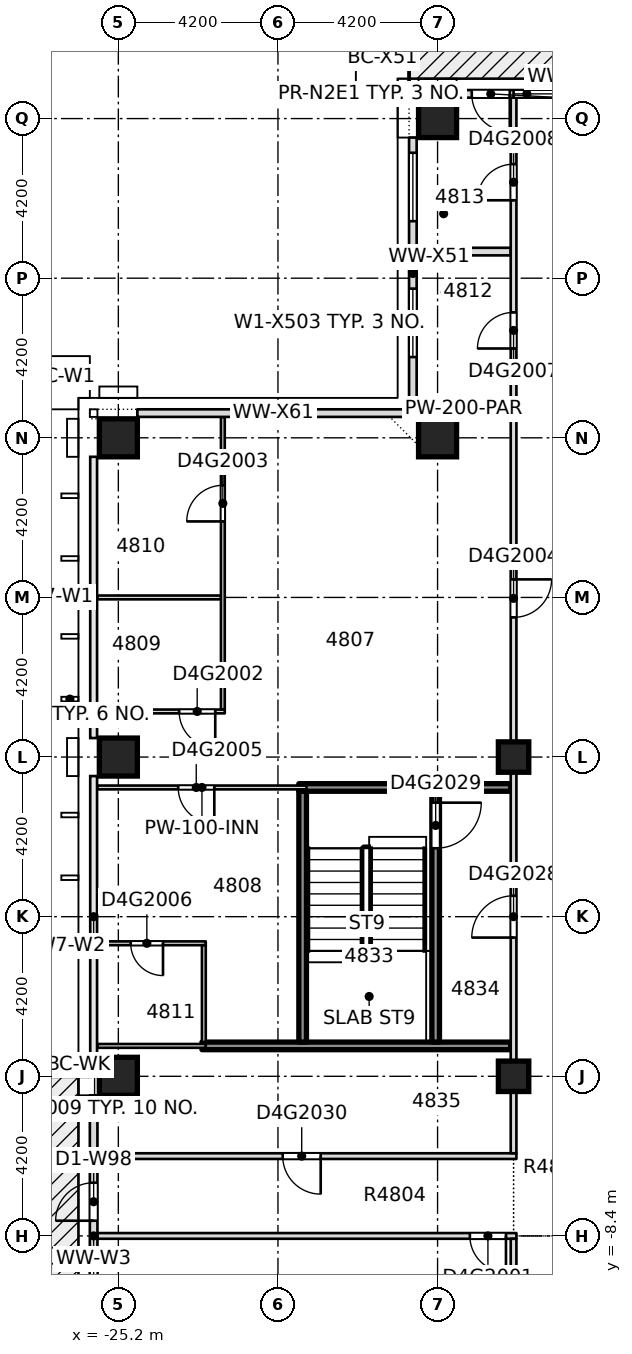
"""IFC4 building model, lengths in metres.
Left out: names, types, materials, properties, quantities, classifications, styles, units other than length and angle.
Written with IfcOpenShell. Run it as: python <this file> out.ifc"""

import sys

from ifc_helpers import new_model, si_unit, direction, frame, frame_2d, origin, origin_2d, place, context, subcontext, project, spatial, rectangle, extrude, element, fill, save


model = new_model("IFC4")
c1 = context("Model", 3, precision=1e-05, world=origin(), true_north=direction((0.0, 1.0)))
c2 = subcontext(c1, "Body", "Model", "MODEL_VIEW")
j1 = project(units=[si_unit("LENGTHUNIT", "METRE"), si_unit("PLANEANGLEUNIT", "RADIAN")], contexts=[c1])
p1 = place(None, origin())
s1 = spatial("IfcSite", under=j1, at=p1, CompositionType="ELEMENT")
p2 = place(p1, origin())
s2 = spatial("IfcBuilding", under=s1, at=p2, CompositionType="ELEMENT")
p3 = place(p2, frame((0.0, 0.0, 185.9)))
s3 = spatial("IfcBuildingStorey", under=s2, at=p3, CompositionType="ELEMENT", Elevation=185.9)
for number, where, z_axis, x_axis in (
    (1, (-25.2, -4.2, -0.4), (0.0, 0.0, 1.0), (1.0, 0.0, 0.0)),
    (2, (-25.2, 4.2, -0.4), (0.0, 0.0, 1.0), (1.0, 0.0, 0.0)),
    (3, (-25.2, 12.6, -0.4), (0.0, 0.0, 1.0), (1.0, 0.0, 0.0)),
    (4, (-16.8, 12.6, -0.4), (0.0, 0.0, 1.0), (1.0, 0.0, 0.0)),
    (5, (-16.8, 21.0, -0.4), (0.0, 0.0, 1.0), (1.0, 0.0, 0.0)),
):
    element("IfcColumn", number, at=place(p3, frame(where, z_axis=z_axis, x_axis=x_axis)), inside=s3, PredefinedType="COLUMN", context=c2, shape_type="SweptSolid", body=[
        extrude(rectangle(XDim=1.0, YDim=1.0, at=origin_2d()), origin(), (0.0, 0.0, 1.0), 3.45),
    ])
for number, where, z_axis, x_axis in (
    (6, (-14.8, -4.2, -0.4), (0.0, 0.0, 1.0), (1.0, 0.0, 0.0)),
    (7, (-14.8, 4.2, -0.4), (0.0, 0.0, 1.0), (1.0, 0.0, 0.0)),
):
    element("IfcColumn", number, at=place(p3, frame(where, z_axis=z_axis, x_axis=x_axis)), inside=s3, PredefinedType="COLUMN", context=c2, shape_type="SweptSolid", body=[
        extrude(rectangle(XDim=0.8, YDim=0.8, at=origin_2d()), origin(), (0.0, 0.0, 1.0), 3.45),
    ])
p4 = place(p3, frame((-25.75, -8.4, 0.0), z_axis=(0.0, 0.0, 1.0), x_axis=(1.0, 0.0, 0.0)))
e8 = element("IfcWall", 8, at=p4, inside=s3, PredefinedType="PARTITIONING", context=c2, shape_type="SweptSolid", body=[
    extrude(rectangle(XDim=11.025, YDim=0.15, at=frame_2d((5.512, 0.0))), origin(), (0.0, 0.0, 1.0), 3.05),
])
p5 = place(p4, frame((9.8, 0.0, 0.0)))
e9 = element("IfcOpeningElement", 9, at=p5, cuts=e8, PredefinedType="OPENING", context=c2, shape_type="SweptSolid", body=[
    extrude(rectangle(XDim=0.95, YDim=2.1, at=frame_2d((0.475, 1.05))), frame((0.0, 0.085, 0.0), z_axis=(0.0, -1.0, 0.0), x_axis=(1.0, 0.0, 0.0)), (0.0, 0.0, 1.0), 0.17),
])
p6 = place(p3, frame((-25.75, -6.3, 0.0), z_axis=(0.0, 0.0, 1.0), x_axis=(1.0, 0.0, 0.0)))
e10 = element("IfcWall", 10, at=p6, inside=s3, PredefinedType="PARTITIONING", context=c2, shape_type="SweptSolid", body=[
    extrude(rectangle(XDim=11.025, YDim=0.15, at=frame_2d((5.512, 0.0))), origin(), (0.0, 0.0, 1.0), 3.05),
])
p7 = place(p6, frame((4.875, 0.0, 0.0)))
e11 = element("IfcOpeningElement", 11, at=p7, cuts=e10, PredefinedType="OPENING", context=c2, shape_type="SweptSolid", body=[
    extrude(rectangle(XDim=1.0, YDim=2.1, at=frame_2d((0.5, 1.05))), frame((0.0, 0.085, 0.0), z_axis=(0.0, -1.0, 0.0), x_axis=(1.0, 0.0, 0.0)), (0.0, 0.0, 1.0), 0.17),
])
p8 = place(p3, frame((-25.75, -3.4, 0.0), z_axis=(0.0, 0.0, 1.0), x_axis=(1.0, 0.0, 0.0)))
e12 = element("IfcWall", 12, at=p8, inside=s3, PredefinedType="PARTITIONING", context=c2, shape_type="SweptSolid", body=[
    extrude(rectangle(XDim=2.85, YDim=0.1, at=frame_2d((1.425, 0.0))), origin(), (0.0, 0.0, 1.0), 3.05),
])
p9 = place(p3, frame((-23.0, -3.4, 0.0), z_axis=(0.0, 0.0, 1.0), x_axis=(1.0, 0.0, 0.0)))
e13 = element("IfcWall", 13, at=p9, inside=s3, PredefinedType="SOLIDWALL", context=c2, shape_type="SweptSolid", body=[
    extrude(rectangle(XDim=8.125, YDim=0.2, at=frame_2d((4.062, 0.0))), origin(), (0.0, 0.0, 1.0), 3.05),
])
p10 = place(p3, frame((-25.75, -0.7, 0.0), z_axis=(0.0, 0.0, 1.0), x_axis=(1.0, 0.0, 0.0)))
e14 = element("IfcWall", 14, at=p10, inside=s3, PredefinedType="PARTITIONING", context=c2, shape_type="SweptSolid", body=[
    extrude(rectangle(XDim=2.85, YDim=0.1, at=frame_2d((1.425, 0.0))), origin(), (0.0, 0.0, 1.0), 3.05),
])
p11 = place(p10, frame((0.875, 0.0, 0.0)))
e15 = element("IfcOpeningElement", 15, at=p11, cuts=e14, PredefinedType="OPENING", context=c2, shape_type="SweptSolid", body=[
    extrude(rectangle(XDim=0.85, YDim=2.1, at=frame_2d((0.425, 1.05))), frame((0.0, 0.06, 0.0), z_axis=(0.0, -1.0, 0.0), x_axis=(1.0, 0.0, 0.0)), (0.0, 0.0, 1.0), 0.12),
])
p12 = place(p3, frame((-25.75, 3.4, 0.0), z_axis=(0.0, 0.0, 1.0), x_axis=(1.0, 0.0, 0.0)))
e16 = element("IfcWall", 16, at=p12, inside=s3, PredefinedType="PARTITIONING", context=c2, shape_type="SweptSolid", body=[
    extrude(rectangle(XDim=5.5, YDim=0.1, at=frame_2d((2.75, 0.0))), origin(), (0.0, 0.0, 1.0), 3.05),
])
p13 = place(p12, frame((2.125, 0.0, 0.0)))
e17 = element("IfcOpeningElement", 17, at=p13, cuts=e16, PredefinedType="OPENING", context=c2, shape_type="SweptSolid", body=[
    extrude(rectangle(XDim=0.95, YDim=2.1, at=frame_2d((0.475, 1.05))), frame((0.0, 0.06, 0.0), z_axis=(0.0, -1.0, 0.0), x_axis=(1.0, 0.0, 0.0)), (0.0, 0.0, 1.0), 0.12),
])
p14 = place(p3, frame((-20.45, 3.4, 0.0), z_axis=(0.0, 0.0, 1.0), x_axis=(1.0, 0.0, 0.0)))
e18 = element("IfcWall", 18, at=p14, inside=s3, PredefinedType="SOLIDWALL", context=c2, shape_type="SweptSolid", body=[
    extrude(rectangle(XDim=5.575, YDim=0.2, at=frame_2d((2.788, 0.0))), origin(), (0.0, 0.0, 1.0), 3.05),
])
p15 = place(p3, frame((-25.75, 5.4, 0.0), z_axis=(0.0, 0.0, 1.0), x_axis=(1.0, 0.0, 0.0)))
e19 = element("IfcWall", 19, at=p15, inside=s3, PredefinedType="PARTITIONING", context=c2, shape_type="SweptSolid", body=[
    extrude(rectangle(XDim=3.35, YDim=0.1, at=frame_2d((1.675, 0.0))), origin(), (0.0, 0.0, 1.0), 3.05),
])
p16 = place(p15, frame((2.15, 0.0, 0.0)))
e20 = element("IfcOpeningElement", 20, at=p16, cuts=e19, PredefinedType="OPENING", context=c2, shape_type="SweptSolid", body=[
    extrude(rectangle(XDim=0.95, YDim=2.1, at=frame_2d((0.475, 1.05))), frame((0.0, 0.06, 0.0), z_axis=(0.0, -1.0, 0.0), x_axis=(1.0, 0.0, 0.0)), (0.0, 0.0, 1.0), 0.12),
])
p17 = place(p3, frame((-25.75, 8.4, 0.0), z_axis=(0.0, 0.0, 1.0), x_axis=(1.0, 0.0, 0.0)))
e21 = element("IfcWall", 21, at=p17, inside=s3, PredefinedType="PARTITIONING", context=c2, shape_type="SweptSolid", body=[
    extrude(rectangle(XDim=3.25, YDim=0.1, at=frame_2d((1.625, 0.0))), origin(), (0.0, 0.0, 1.0), 3.05),
])
for number, where, z_axis, x_axis in (
    (22, (-17.35, 13.35, 0.0), (0.0, 0.0, 1.0), (1.0, 0.0, 0.0)),
    (23, (-17.35, 17.5, 0.0), (0.0, 0.0, 1.0), (1.0, 0.0, 0.0)),
):
    element("IfcWall", number, at=place(p3, frame(where, z_axis=z_axis, x_axis=x_axis)), inside=s3, PredefinedType="PARTITIONING", context=c2, shape_type="SweptSolid", body=[
        extrude(rectangle(XDim=2.475, YDim=0.2, at=frame_2d((1.238, 0.0))), origin(), (0.0, 0.0, 1.0), 3.05),
    ])
p18 = place(p3, frame((-22.95, -3.3, 0.0), z_axis=(0.0, 0.0, 1.0), x_axis=(0.0, 1.0, 0.0)))
e24 = element("IfcWall", 24, at=p18, inside=s3, PredefinedType="PARTITIONING", context=c2, shape_type="SweptSolid", body=[
    extrude(rectangle(XDim=2.55, YDim=0.1, at=frame_2d((1.275, 0.0))), origin(), (0.0, 0.0, 1.0), 3.05),
])
p19 = place(p3, frame((-22.45, 5.45, 0.0), z_axis=(0.0, 0.0, 1.0), x_axis=(0.0, 1.0, 0.0)))
e25 = element("IfcWall", 25, at=p19, inside=s3, PredefinedType="PARTITIONING", context=c2, shape_type="SweptSolid", body=[
    extrude(rectangle(XDim=7.7, YDim=0.1, at=frame_2d((3.85, 0.0))), origin(), (0.0, 0.0, 1.0), 3.05),
])
p20 = place(p19, frame((4.95, 0.0, 0.0)))
e26 = element("IfcOpeningElement", 26, at=p20, cuts=e25, PredefinedType="OPENING", context=c2, shape_type="SweptSolid", body=[
    extrude(rectangle(XDim=0.95, YDim=2.1, at=frame_2d((0.475, 1.05))), frame((0.0, 0.06, 0.0), z_axis=(0.0, -1.0, 0.0), x_axis=(1.0, 0.0, 0.0)), (0.0, 0.0, 1.0), 0.12),
])
p21 = place(p3, frame((-20.35, -3.3, 0.0), z_axis=(0.0, 0.0, 1.0), x_axis=(0.0, 1.0, 0.0)))
e27 = element("IfcWall", 27, at=p21, inside=s3, PredefinedType="SOLIDWALL", context=c2, shape_type="SweptSolid", body=[
    extrude(rectangle(XDim=6.6, YDim=0.2, at=frame_2d((3.3, 0.0))), origin(), (0.0, 0.0, 1.0), 3.05),
])
p22 = place(p3, frame((-16.85, -3.3, 0.0), z_axis=(0.0, 0.0, 1.0), x_axis=(0.0, 1.0, 0.0)))
e28 = element("IfcWall", 28, at=p22, inside=s3, PredefinedType="SOLIDWALL", context=c2, shape_type="SweptSolid", body=[
    extrude(rectangle(XDim=6.6, YDim=0.2, at=frame_2d((3.3, 0.0))), origin(), (0.0, 0.0, 1.0), 3.05),
])
p23 = place(p22, frame((5.1, 0.0, 0.0)))
e29 = element("IfcOpeningElement", 29, at=p23, cuts=e28, PredefinedType="OPENING", context=c2, shape_type="SweptSolid", body=[
    extrude(rectangle(XDim=1.2, YDim=2.1, at=frame_2d((0.6, 1.05))), frame((0.0, 0.11, 0.0), z_axis=(0.0, -1.0, 0.0), x_axis=(1.0, 0.0, 0.0)), (0.0, 0.0, 1.0), 0.22),
])
p24 = place(p3, frame((-14.8, -10.6, 0.0), z_axis=(0.0, 0.0, 1.0), x_axis=(0.0, 1.0, 0.0)))
e30 = element("IfcWall", 30, at=p24, inside=s3, PredefinedType="PARTITIONING", context=c2, shape_type="SweptSolid", body=[
    extrude(rectangle(XDim=2.125, YDim=0.15, at=frame_2d((1.062, 0.0))), origin(), (0.0, 0.0, 1.0), 3.05),
])
p25 = place(p3, frame((-14.8, -6.225, 0.0), z_axis=(0.0, 0.0, 1.0), x_axis=(0.0, 1.0, 0.0)))
e31 = element("IfcWall", 31, at=p25, inside=s3, PredefinedType="PARTITIONING", context=c2, shape_type="SweptSolid", body=[
    extrude(rectangle(XDim=27.775, YDim=0.15, at=frame_2d((13.888, 0.0))), origin(), (0.0, 0.0, 1.0), 3.05),
])
p26 = place(p25, frame((14.1, 0.0, 0.0)))
e32 = element("IfcOpeningElement", 32, at=p26, cuts=e31, PredefinedType="OPENING", context=c2, shape_type="SweptSolid", body=[
    extrude(rectangle(XDim=1.0, YDim=2.1, at=frame_2d((0.5, 1.05))), frame((0.0, 0.085, 0.0), z_axis=(0.0, -1.0, 0.0), x_axis=(1.0, 0.0, 0.0)), (0.0, 0.0, 1.0), 0.17),
])
p27 = place(p25, frame((21.175, 0.0, 0.0)))
e33 = element("IfcOpeningElement", 33, at=p27, cuts=e31, PredefinedType="OPENING", context=c2, shape_type="SweptSolid", body=[
    extrude(rectangle(XDim=0.95, YDim=2.1, at=frame_2d((0.475, 1.05))), frame((0.0, 0.085, 0.0), z_axis=(0.0, -1.0, 0.0), x_axis=(1.0, 0.0, 0.0)), (0.0, 0.0, 1.0), 0.17),
])
p28 = place(p25, frame((25.075, 0.0, 0.0)))
e34 = element("IfcOpeningElement", 34, at=p28, cuts=e31, PredefinedType="OPENING", context=c2, shape_type="SweptSolid", body=[
    extrude(rectangle(XDim=0.95, YDim=2.1, at=frame_2d((0.475, 1.05))), frame((0.0, 0.085, 0.0), z_axis=(0.0, -1.0, 0.0), x_axis=(1.0, 0.0, 0.0)), (0.0, 0.0, 1.0), 0.17),
])
p29 = place(p25, frame((5.675, 0.0, 0.0)))
e35 = element("IfcOpeningElement", 35, at=p29, cuts=e31, PredefinedType="OPENING", context=c2, shape_type="SweptSolid", body=[
    extrude(rectangle(XDim=1.1, YDim=2.1, at=frame_2d((0.55, 1.05))), frame((0.0, 0.085, 0.0), z_axis=(0.0, -1.0, 0.0), x_axis=(1.0, 0.0, 0.0)), (0.0, 0.0, 1.0), 0.17),
])
p30 = place(p3, frame((-12.6, 21.65, 0.0), z_axis=(0.0, 0.0, 1.0), x_axis=(-1.0, 0.0, 0.0)))
e36 = element("IfcWall", 36, at=p30, inside=s3, PredefinedType="STANDARD", context=c2, shape_type="SweptSolid", body=[
    extrude(rectangle(XDim=3.7, YDim=0.2, at=frame_2d((1.85, 0.0))), origin(), (0.0, 0.0, 1.0), 3.05),
])
p31 = place(p30, frame((0.4, 0.0, 0.2)))
e37 = element("IfcOpeningElement", 37, at=p31, cuts=e36, PredefinedType="OPENING", context=c2, shape_type="SweptSolid", body=[
    extrude(rectangle(XDim=1.8, YDim=2.65, at=frame_2d((0.9, 1.325))), frame((0.0, 0.11, 0.0), z_axis=(0.0, -1.0, 0.0), x_axis=(1.0, 0.0, 0.0)), (0.0, 0.0, 1.0), 0.22),
])
p32 = place(p30, frame((2.3, 0.0, 0.0)))
e38 = element("IfcOpeningElement", 38, at=p32, cuts=e36, PredefinedType="OPENING", context=c2, shape_type="SweptSolid", body=[
    extrude(rectangle(XDim=1.0, YDim=2.4, at=frame_2d((0.5, 1.2))), frame((0.0, 0.11, 0.0), z_axis=(0.0, -1.0, 0.0), x_axis=(1.0, 0.0, 0.0)), (0.0, 0.0, 1.0), 0.22),
])
p33 = place(p3, frame((-17.45, 20.5, 0.0), z_axis=(0.0, 0.0, 1.0), x_axis=(0.0, -1.0, 0.0)))
e39 = element("IfcWall", 39, at=p33, inside=s3, PredefinedType="STANDARD", context=c2, shape_type="SweptSolid", body=[
    extrude(rectangle(XDim=7.15, YDim=0.2, at=frame_2d((3.575, 0.0))), origin(), (0.0, 0.0, 1.0), 3.05),
])
p34 = place(p33, frame((3.975, 0.0, 0.2)))
e40 = element("IfcOpeningElement", 40, at=p34, cuts=e39, PredefinedType="OPENING", context=c2, shape_type="SweptSolid", body=[
    extrude(rectangle(XDim=1.8, YDim=2.65, at=frame_2d((0.9, 1.325))), frame((0.0, 0.11, 0.0), z_axis=(0.0, -1.0, 0.0), x_axis=(1.0, 0.0, 0.0)), (0.0, 0.0, 1.0), 0.22),
])
p35 = place(p33, frame((0.4, 0.0, 0.2)))
e41 = element("IfcOpeningElement", 41, at=p35, cuts=e39, PredefinedType="OPENING", context=c2, shape_type="SweptSolid", body=[
    extrude(rectangle(XDim=1.8, YDim=2.65, at=frame_2d((0.9, 1.325))), frame((0.0, 0.11, 0.0), z_axis=(0.0, -1.0, 0.0), x_axis=(1.0, 0.0, 0.0)), (0.0, 0.0, 1.0), 0.22),
])
p36 = place(p3, frame((-17.55, 13.25, 0.0), z_axis=(0.0, 0.0, 1.0), x_axis=(-1.0, 0.0, 0.0)))
e42 = element("IfcWall", 42, at=p36, inside=s3, PredefinedType="STANDARD", context=c2, shape_type="SweptSolid", body=[
    extrude(rectangle(XDim=7.15, YDim=0.2, at=frame_2d((3.575, 0.0))), origin(), (0.0, 0.0, 1.0), 3.05),
])
p37 = place(p3, frame((-25.85, -4.7, 0.0), z_axis=(0.0, 0.0, 1.0), x_axis=(0.0, -1.0, 0.0)))
e43 = element("IfcWall", 43, at=p37, inside=s3, PredefinedType="STANDARD", context=c2, shape_type="SweptSolid", body=[
    extrude(rectangle(XDim=7.4, YDim=0.2, at=frame_2d((3.7, 0.0))), origin(), (0.0, 0.0, 1.0), 3.05),
])
p38 = place(p37, frame((4.1, 0.0, 0.2)))
e44 = element("IfcOpeningElement", 44, at=p38, cuts=e43, PredefinedType="OPENING", context=c2, shape_type="SweptSolid", body=[
    extrude(rectangle(XDim=1.8, YDim=2.65, at=frame_2d((0.9, 1.325))), frame((0.0, 0.11, 0.0), z_axis=(0.0, -1.0, 0.0), x_axis=(1.0, 0.0, 0.0)), (0.0, 0.0, 1.0), 0.22),
])
p39 = place(p37, frame((6.0, 0.0, 0.0)))
e45 = element("IfcOpeningElement", 45, at=p39, cuts=e43, PredefinedType="OPENING", context=c2, shape_type="SweptSolid", body=[
    extrude(rectangle(XDim=1.0, YDim=2.4, at=frame_2d((0.5, 1.2))), frame((0.0, 0.11, 0.0), z_axis=(0.0, -1.0, 0.0), x_axis=(1.0, 0.0, 0.0)), (0.0, 0.0, 1.0), 0.22),
])
p40 = place(p37, frame((2.3, 0.0, 0.0)))
e46 = element("IfcOpeningElement", 46, at=p40, cuts=e43, PredefinedType="OPENING", context=c2, shape_type="SweptSolid", body=[
    extrude(rectangle(XDim=1.0, YDim=2.4, at=frame_2d((0.5, 1.2))), frame((0.0, 0.11, 0.0), z_axis=(0.0, -1.0, 0.0), x_axis=(1.0, 0.0, 0.0)), (0.0, 0.0, 1.0), 0.22),
])
p41 = place(p5, origin())
e47 = element("IfcDoor", 47, at=p41, inside=s3, OperationType="SINGLE_SWING_RIGHT", PredefinedType="DOOR", context=c2, shape_type="SweptSolid", body=[
    extrude(rectangle(XDim=0.95, YDim=2.1, at=frame_2d((0.475, 1.05))), frame((0.0, 0.025, 0.0), z_axis=(0.0, -1.0, 0.0), x_axis=(1.0, 0.0, 0.0)), (0.0, 0.0, 1.0), 0.05),
])
fill(e9, e47)
p42 = place(p16, origin())
e48 = element("IfcDoor", 48, at=p42, inside=s3, OperationType="SINGLE_SWING_RIGHT", PredefinedType="DOOR", context=c2, shape_type="SweptSolid", body=[
    extrude(rectangle(XDim=0.95, YDim=2.1, at=frame_2d((0.475, 1.05))), frame((0.0, 0.025, 0.0), z_axis=(0.0, -1.0, 0.0), x_axis=(1.0, 0.0, 0.0)), (0.0, 0.0, 1.0), 0.05),
])
fill(e20, e48)
p43 = place(p20, origin())
e49 = element("IfcDoor", 49, at=p43, inside=s3, OperationType="SINGLE_SWING_RIGHT", PredefinedType="DOOR", context=c2, shape_type="SweptSolid", body=[
    extrude(rectangle(XDim=0.95, YDim=2.1, at=frame_2d((0.475, 1.05))), frame((0.0, 0.025, 0.0), z_axis=(0.0, -1.0, 0.0), x_axis=(1.0, 0.0, 0.0)), (0.0, 0.0, 1.0), 0.05),
])
fill(e26, e49)
p44 = place(p26, origin())
e50 = element("IfcDoor", 50, at=p44, inside=s3, OperationType="SINGLE_SWING_LEFT", PredefinedType="DOOR", context=c2, shape_type="SweptSolid", body=[
    extrude(rectangle(XDim=1.0, YDim=2.1, at=frame_2d((0.5, 1.05))), frame((0.0, 0.025, 0.0), z_axis=(0.0, -1.0, 0.0), x_axis=(1.0, 0.0, 0.0)), (0.0, 0.0, 1.0), 0.05),
])
fill(e32, e50)
p45 = place(p13, origin())
e51 = element("IfcDoor", 51, at=p45, inside=s3, OperationType="SINGLE_SWING_LEFT", PredefinedType="DOOR", context=c2, shape_type="SweptSolid", body=[
    extrude(rectangle(XDim=0.95, YDim=2.1, at=frame_2d((0.475, 1.05))), frame((0.0, 0.025, 0.0), z_axis=(0.0, -1.0, 0.0), x_axis=(1.0, 0.0, 0.0)), (0.0, 0.0, 1.0), 0.05),
])
fill(e17, e51)
p46 = place(p11, origin())
e52 = element("IfcDoor", 52, at=p46, inside=s3, OperationType="SINGLE_SWING_RIGHT", PredefinedType="DOOR", context=c2, shape_type="SweptSolid", body=[
    extrude(rectangle(XDim=0.85, YDim=2.1, at=frame_2d((0.425, 1.05))), frame((0.0, 0.025, 0.0), z_axis=(0.0, -1.0, 0.0), x_axis=(1.0, 0.0, 0.0)), (0.0, 0.0, 1.0), 0.05),
])
fill(e15, e52)
p47 = place(p27, origin())
e53 = element("IfcDoor", 53, at=p47, inside=s3, OperationType="SINGLE_SWING_RIGHT", PredefinedType="DOOR", context=c2, shape_type="SweptSolid", body=[
    extrude(rectangle(XDim=0.95, YDim=2.1, at=frame_2d((0.475, 1.05))), frame((0.0, 0.025, 0.0), z_axis=(0.0, -1.0, 0.0), x_axis=(1.0, 0.0, 0.0)), (0.0, 0.0, 1.0), 0.05),
])
fill(e33, e53)
p48 = place(p28, origin())
e54 = element("IfcDoor", 54, at=p48, inside=s3, OperationType="SINGLE_SWING_LEFT", PredefinedType="DOOR", context=c2, shape_type="SweptSolid", body=[
    extrude(rectangle(XDim=0.95, YDim=2.1, at=frame_2d((0.475, 1.05))), frame((0.0, 0.025, 0.0), z_axis=(0.0, -1.0, 0.0), x_axis=(1.0, 0.0, 0.0)), (0.0, 0.0, 1.0), 0.05),
])
fill(e34, e54)
p49 = place(p29, origin())
e55 = element("IfcDoor", 55, at=p49, inside=s3, OperationType="SINGLE_SWING_RIGHT", PredefinedType="DOOR", context=c2, shape_type="SweptSolid", body=[
    extrude(rectangle(XDim=1.1, YDim=2.1, at=frame_2d((0.55, 1.05))), frame((0.0, 0.025, 0.0), z_axis=(0.0, -1.0, 0.0), x_axis=(1.0, 0.0, 0.0)), (0.0, 0.0, 1.0), 0.05),
])
fill(e35, e55)
p50 = place(p23, origin())
e56 = element("IfcDoor", 56, at=p50, inside=s3, OperationType="SINGLE_SWING_RIGHT", PredefinedType="DOOR", context=c2, shape_type="SweptSolid", body=[
    extrude(rectangle(XDim=1.2, YDim=2.1, at=frame_2d((0.6, 1.05))), frame((0.0, 0.025, 0.0), z_axis=(0.0, -1.0, 0.0), x_axis=(1.0, 0.0, 0.0)), (0.0, 0.0, 1.0), 0.05),
])
fill(e29, e56)
p51 = place(p7, origin())
e57 = element("IfcDoor", 57, at=p51, inside=s3, OperationType="SINGLE_SWING_RIGHT", PredefinedType="DOOR", context=c2, shape_type="SweptSolid", body=[
    extrude(rectangle(XDim=1.0, YDim=2.1, at=frame_2d((0.5, 1.05))), frame((0.0, 0.025, 0.0), z_axis=(0.0, -1.0, 0.0), x_axis=(1.0, 0.0, 0.0)), (0.0, 0.0, 1.0), 0.05),
])
fill(e11, e57)
p52 = place(p31, origin())
e58 = element("IfcWindow", 58, at=p52, inside=s3, PartitioningType="SINGLE_PANEL", PredefinedType="WINDOW", context=c2, shape_type="SweptSolid", body=[
    extrude(rectangle(XDim=1.8, YDim=2.65, at=frame_2d((0.9, 1.325))), frame((0.0, 0.03, 0.0), z_axis=(0.0, -1.0, 0.0), x_axis=(1.0, 0.0, 0.0)), (0.0, 0.0, 1.0), 0.06),
])
fill(e37, e58)
p53 = place(p32, origin())
e59 = element("IfcDoor", 59, at=p53, inside=s3, OperationType="SINGLE_SWING_LEFT", PredefinedType="DOOR", context=c2, shape_type="SweptSolid", body=[
    extrude(rectangle(XDim=1.0, YDim=2.4, at=frame_2d((0.5, 1.2))), frame((0.0, 0.025, 0.0), z_axis=(0.0, -1.0, 0.0), x_axis=(1.0, 0.0, 0.0)), (0.0, 0.0, 1.0), 0.05),
])
fill(e38, e59)
p54 = place(p34, origin())
e60 = element("IfcWindow", 60, at=p54, inside=s3, PartitioningType="SINGLE_PANEL", PredefinedType="WINDOW", context=c2, shape_type="SweptSolid", body=[
    extrude(rectangle(XDim=1.8, YDim=2.65, at=frame_2d((0.9, 1.325))), frame((0.0, 0.03, 0.0), z_axis=(0.0, -1.0, 0.0), x_axis=(1.0, 0.0, 0.0)), (0.0, 0.0, 1.0), 0.06),
])
fill(e40, e60)
p55 = place(p35, origin())
e61 = element("IfcWindow", 61, at=p55, inside=s3, PartitioningType="SINGLE_PANEL", PredefinedType="WINDOW", context=c2, shape_type="SweptSolid", body=[
    extrude(rectangle(XDim=1.8, YDim=2.65, at=frame_2d((0.9, 1.325))), frame((0.0, 0.03, 0.0), z_axis=(0.0, -1.0, 0.0), x_axis=(1.0, 0.0, 0.0)), (0.0, 0.0, 1.0), 0.06),
])
fill(e41, e61)
p56 = place(p38, origin())
e62 = element("IfcWindow", 62, at=p56, inside=s3, PartitioningType="SINGLE_PANEL", PredefinedType="WINDOW", context=c2, shape_type="SweptSolid", body=[
    extrude(rectangle(XDim=1.8, YDim=2.65, at=frame_2d((0.9, 1.325))), frame((0.0, 0.03, 0.0), z_axis=(0.0, -1.0, 0.0), x_axis=(1.0, 0.0, 0.0)), (0.0, 0.0, 1.0), 0.06),
])
fill(e44, e62)
p57 = place(p40, origin())
e63 = element("IfcDoor", 63, at=p57, inside=s3, OperationType="SINGLE_SWING_LEFT", PredefinedType="DOOR", context=c2, shape_type="SweptSolid", body=[
    extrude(rectangle(XDim=1.0, YDim=2.4, at=frame_2d((0.5, 1.2))), frame((0.0, 0.025, 0.0), z_axis=(0.0, -1.0, 0.0), x_axis=(1.0, 0.0, 0.0)), (0.0, 0.0, 1.0), 0.05),
])
fill(e46, e63)
save(model, sys.argv[1])
